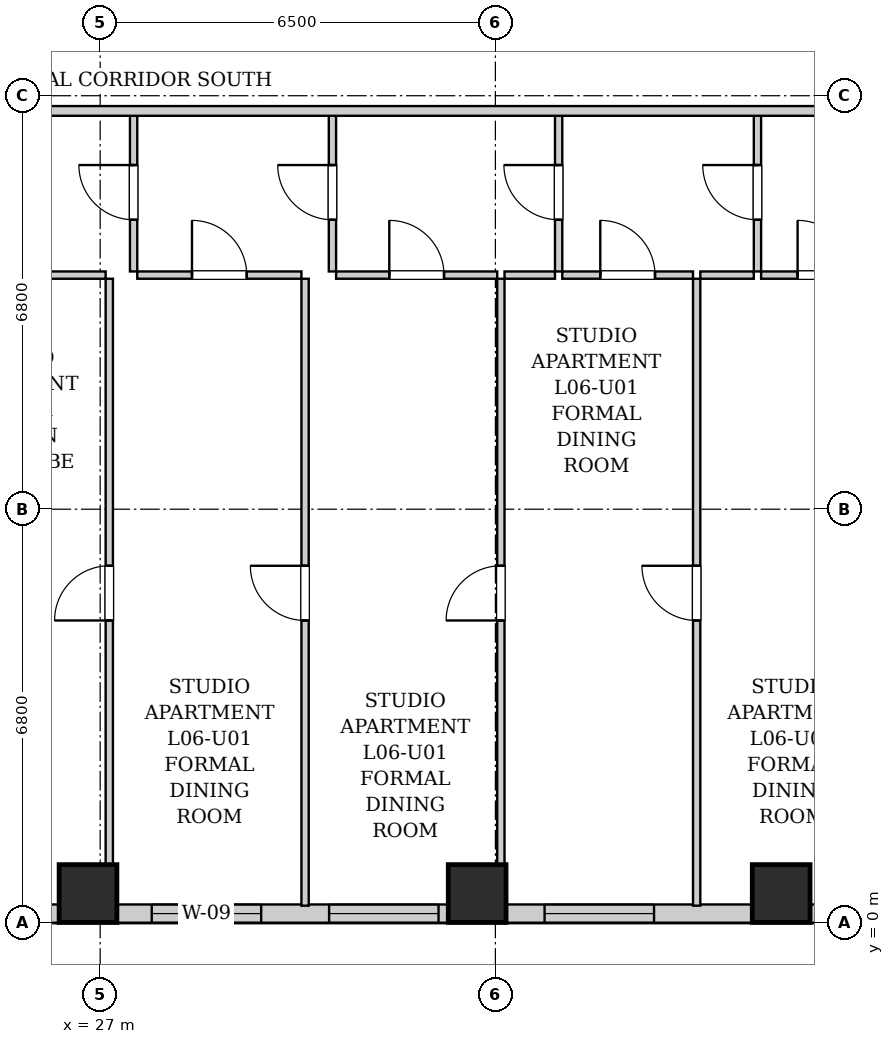
"""IFC4 building model, lengths in metres.
Left out: names, types, materials, properties, quantities, classifications, styles, units other than length and angle.
Written with IfcOpenShell. Run it as: python <this file> out.ifc"""

import sys

from ifc_helpers import new_model, si_unit, direction, frame, frame_2d, origin, origin_2d, place, context, subcontext, project, spatial, rectangle, extrude, element, fill, save


model = new_model("IFC4")
c1 = context("Model", 3, precision=1e-05, world=origin(), true_north=direction((0.0, 1.0)))
c2 = subcontext(c1, "Body", "Model", "MODEL_VIEW")
j1 = project(units=[si_unit("LENGTHUNIT", "METRE"), si_unit("PLANEANGLEUNIT", "RADIAN")], contexts=[c1])
p1 = place(None, origin())
s1 = spatial("IfcSite", under=j1, at=p1, CompositionType="ELEMENT")
p2 = place(p1, origin())
s2 = spatial("IfcBuilding", under=s1, at=p2, CompositionType="ELEMENT")
p3 = place(p2, frame((0.0, 0.0, 29.0)))
s3 = spatial("IfcBuildingStorey", under=s2, at=p3, CompositionType="ELEMENT", Elevation=29.0)
for number, where, z_axis, x_axis in (
    (1, (26.8, 0.48, 0.0), (0.0, 0.0, 1.0), (1.0, 0.0, 0.0)),
    (2, (33.2, 0.48, 0.0), (0.0, 0.0, 1.0), (1.0, 0.0, 0.0)),
    (3, (38.2, 0.48, 0.0), (0.0, 0.0, 1.0), (1.0, 0.0, 0.0)),
):
    element("IfcColumn", number, at=place(p3, frame(where, z_axis=z_axis, x_axis=x_axis)), inside=s3, PredefinedType="COLUMN", context=c2, shape_type="SweptSolid", body=[
        extrude(rectangle(XDim=0.95, YDim=0.95, at=origin_2d()), origin(), (0.0, 0.0, 1.0), 3.2),
    ])
p4 = place(p3, frame((44.0, 0.15, 0.0), z_axis=(0.0, 0.0, 1.0), x_axis=(-1.0, 0.0, 0.0)))
e4 = element("IfcWall", 4, at=p4, inside=s3, PredefinedType="SOLIDWALL", context=c2, shape_type="SweptSolid", body=[
    extrude(rectangle(XDim=28.1, YDim=0.3, at=frame_2d((14.05, 0.0))), origin(), (0.0, 0.0, 1.0), 1.975),
])
p5 = place(p4, frame((26.835, 0.0, 0.55)))
e5 = element("IfcOpeningElement", 5, at=p5, cuts=e4, PredefinedType="OPENING", context=c2, shape_type="SweptSolid", body=[
    extrude(rectangle(XDim=0.85, YDim=1.2, at=frame_2d((0.425, 0.6))), frame((0.0, 0.16, 0.0), z_axis=(0.0, -1.0, 0.0), x_axis=(1.0, 0.0, 0.0)), (0.0, 0.0, 1.0), 0.32),
])
p6 = place(p4, frame((23.765, 0.0, 0.55)))
e6 = element("IfcOpeningElement", 6, at=p6, cuts=e4, PredefinedType="OPENING", context=c2, shape_type="SweptSolid", body=[
    extrude(rectangle(XDim=1.8, YDim=1.2, at=frame_2d((0.9, 0.6))), frame((0.0, 0.16, 0.0), z_axis=(0.0, -1.0, 0.0), x_axis=(1.0, 0.0, 0.0)), (0.0, 0.0, 1.0), 0.32),
])
p7 = place(p4, frame((21.5, 0.0, 0.55)))
e7 = element("IfcOpeningElement", 7, at=p7, cuts=e4, PredefinedType="OPENING", context=c2, shape_type="SweptSolid", body=[
    extrude(rectangle(XDim=1.35, YDim=1.2, at=frame_2d((0.675, 0.6))), frame((0.0, 0.16, 0.0), z_axis=(0.0, -1.0, 0.0), x_axis=(1.0, 0.0, 0.0)), (0.0, 0.0, 1.0), 0.32),
])
p8 = place(p4, frame((14.352, 0.0, 0.55)))
e8 = element("IfcOpeningElement", 8, at=p8, cuts=e4, PredefinedType="OPENING", context=c2, shape_type="SweptSolid", body=[
    extrude(rectangle(XDim=1.8, YDim=1.2, at=frame_2d((0.9, 0.6))), frame((0.0, 0.16, 0.0), z_axis=(0.0, -1.0, 0.0), x_axis=(1.0, 0.0, 0.0)), (0.0, 0.0, 1.0), 0.32),
])
p9 = place(p4, frame((11.435, 0.0, 0.55)))
e9 = element("IfcOpeningElement", 9, at=p9, cuts=e4, PredefinedType="OPENING", context=c2, shape_type="SweptSolid", body=[
    extrude(rectangle(XDim=1.8, YDim=1.2, at=frame_2d((0.9, 0.6))), frame((0.0, 0.16, 0.0), z_axis=(0.0, -1.0, 0.0), x_axis=(1.0, 0.0, 0.0)), (0.0, 0.0, 1.0), 0.32),
])
p10 = place(p4, frame((7.891, 0.0, 0.55)))
e10 = element("IfcOpeningElement", 10, at=p10, cuts=e4, PredefinedType="OPENING", context=c2, shape_type="SweptSolid", body=[
    extrude(rectangle(XDim=1.8, YDim=1.2, at=frame_2d((0.9, 0.6))), frame((0.0, 0.16, 0.0), z_axis=(0.0, -1.0, 0.0), x_axis=(1.0, 0.0, 0.0)), (0.0, 0.0, 1.0), 0.32),
])
p11 = place(p4, frame((4.315, 0.0, 0.55)))
e11 = element("IfcOpeningElement", 11, at=p11, cuts=e4, PredefinedType="OPENING", context=c2, shape_type="SweptSolid", body=[
    extrude(rectangle(XDim=0.85, YDim=1.2, at=frame_2d((0.425, 0.6))), frame((0.0, 0.16, 0.0), z_axis=(0.0, -1.0, 0.0), x_axis=(1.0, 0.0, 0.0)), (0.0, 0.0, 1.0), 0.32),
])
p12 = place(p3, frame((27.55, 10.71, 0.0), z_axis=(0.0, 0.0, 1.0), x_axis=(0.0, 1.0, 0.0)))
e12 = element("IfcWall", 12, at=p12, inside=s3, PredefinedType="PARTITIONING", context=c2, shape_type="SweptSolid", body=[
    extrude(rectangle(XDim=2.6, YDim=0.12, at=frame_2d((1.3, 0.0))), origin(), (0.0, 0.0, 1.0), 2.94),
])
p13 = place(p12, frame((0.85, 0.0, 0.0)))
e13 = element("IfcOpeningElement", 13, at=p13, cuts=e12, PredefinedType="OPENING", context=c2, shape_type="SweptSolid", body=[
    extrude(rectangle(XDim=0.9, YDim=2.05, at=frame_2d((0.45, 1.025))), frame((0.0, 0.07, 0.0), z_axis=(0.0, -1.0, 0.0), x_axis=(1.0, 0.0, 0.0)), (0.0, 0.0, 1.0), 0.14),
])
p14 = place(p3, frame((23.99, 10.65, 0.0), z_axis=(0.0, 0.0, 1.0), x_axis=(1.0, 0.0, 0.0)))
e14 = element("IfcWall", 14, at=p14, inside=s3, PredefinedType="PARTITIONING", context=c2, shape_type="SweptSolid", body=[
    extrude(rectangle(XDim=3.1, YDim=0.12, at=frame_2d((1.55, 0.0))), origin(), (0.0, 0.0, 1.0), 2.94),
])
p15 = place(p14, frame((1.1, 0.0, 0.0)))
e15 = element("IfcOpeningElement", 15, at=p15, cuts=e14, PredefinedType="OPENING", context=c2, shape_type="SweptSolid", body=[
    extrude(rectangle(XDim=0.9, YDim=2.05, at=frame_2d((0.45, 1.025))), frame((0.0, 0.07, 0.0), z_axis=(0.0, -1.0, 0.0), x_axis=(1.0, 0.0, 0.0)), (0.0, 0.0, 1.0), 0.14),
])
p16 = place(p3, frame((30.82, 10.71, 0.0), z_axis=(0.0, 0.0, 1.0), x_axis=(0.0, 1.0, 0.0)))
e16 = element("IfcWall", 16, at=p16, inside=s3, PredefinedType="PARTITIONING", context=c2, shape_type="SweptSolid", body=[
    extrude(rectangle(XDim=2.6, YDim=0.12, at=frame_2d((1.3, 0.0))), origin(), (0.0, 0.0, 1.0), 2.94),
])
p17 = place(p16, frame((0.85, 0.0, 0.0)))
e17 = element("IfcOpeningElement", 17, at=p17, cuts=e16, PredefinedType="OPENING", context=c2, shape_type="SweptSolid", body=[
    extrude(rectangle(XDim=0.9, YDim=2.05, at=frame_2d((0.45, 1.025))), frame((0.0, 0.07, 0.0), z_axis=(0.0, -1.0, 0.0), x_axis=(1.0, 0.0, 0.0)), (0.0, 0.0, 1.0), 0.14),
])
p18 = place(p3, frame((27.61, 10.65, 0.0), z_axis=(0.0, 0.0, 1.0), x_axis=(1.0, 0.0, 0.0)))
e18 = element("IfcWall", 18, at=p18, inside=s3, PredefinedType="PARTITIONING", context=c2, shape_type="SweptSolid", body=[
    extrude(rectangle(XDim=2.7, YDim=0.12, at=frame_2d((1.35, 0.0))), origin(), (0.0, 0.0, 1.0), 2.94),
])
p19 = place(p18, frame((0.9, 0.0, 0.0)))
e19 = element("IfcOpeningElement", 19, at=p19, cuts=e18, PredefinedType="OPENING", context=c2, shape_type="SweptSolid", body=[
    extrude(rectangle(XDim=0.9, YDim=2.05, at=frame_2d((0.45, 1.025))), frame((0.0, 0.07, 0.0), z_axis=(0.0, -1.0, 0.0), x_axis=(1.0, 0.0, 0.0)), (0.0, 0.0, 1.0), 0.14),
])
p20 = place(p3, frame((34.54, 10.71, 0.0), z_axis=(0.0, 0.0, 1.0), x_axis=(0.0, 1.0, 0.0)))
e20 = element("IfcWall", 20, at=p20, inside=s3, PredefinedType="PARTITIONING", context=c2, shape_type="SweptSolid", body=[
    extrude(rectangle(XDim=2.6, YDim=0.12, at=frame_2d((1.3, 0.0))), origin(), (0.0, 0.0, 1.0), 2.94),
])
p21 = place(p20, frame((0.85, 0.0, 0.0)))
e21 = element("IfcOpeningElement", 21, at=p21, cuts=e20, PredefinedType="OPENING", context=c2, shape_type="SweptSolid", body=[
    extrude(rectangle(XDim=0.9, YDim=2.05, at=frame_2d((0.45, 1.025))), frame((0.0, 0.07, 0.0), z_axis=(0.0, -1.0, 0.0), x_axis=(1.0, 0.0, 0.0)), (0.0, 0.0, 1.0), 0.14),
])
p22 = place(p3, frame((30.88, 10.65, 0.0), z_axis=(0.0, 0.0, 1.0), x_axis=(1.0, 0.0, 0.0)))
e22 = element("IfcWall", 22, at=p22, inside=s3, PredefinedType="PARTITIONING", context=c2, shape_type="SweptSolid", body=[
    extrude(rectangle(XDim=2.65, YDim=0.12, at=frame_2d((1.325, 0.0))), origin(), (0.0, 0.0, 1.0), 2.94),
])
p23 = place(p22, frame((0.875, 0.0, 0.0)))
e23 = element("IfcOpeningElement", 23, at=p23, cuts=e22, PredefinedType="OPENING", context=c2, shape_type="SweptSolid", body=[
    extrude(rectangle(XDim=0.9, YDim=2.05, at=frame_2d((0.45, 1.025))), frame((0.0, 0.07, 0.0), z_axis=(0.0, -1.0, 0.0), x_axis=(1.0, 0.0, 0.0)), (0.0, 0.0, 1.0), 0.14),
])
p24 = place(p3, frame((33.65, 10.65, 0.0), z_axis=(0.0, 0.0, 1.0), x_axis=(1.0, 0.0, 0.0)))
e24 = element("IfcWall", 24, at=p24, inside=s3, PredefinedType="PARTITIONING", context=c2, shape_type="SweptSolid", body=[
    extrude(rectangle(XDim=0.83, YDim=0.12, at=frame_2d((0.415, 0.0))), origin(), (0.0, 0.0, 1.0), 2.94),
])
p25 = place(p3, frame((37.81, 10.71, 0.0), z_axis=(0.0, 0.0, 1.0), x_axis=(0.0, 1.0, 0.0)))
e25 = element("IfcWall", 25, at=p25, inside=s3, PredefinedType="PARTITIONING", context=c2, shape_type="SweptSolid", body=[
    extrude(rectangle(XDim=2.6, YDim=0.12, at=frame_2d((1.3, 0.0))), origin(), (0.0, 0.0, 1.0), 2.94),
])
p26 = place(p25, frame((0.85, 0.0, 0.0)))
e26 = element("IfcOpeningElement", 26, at=p26, cuts=e25, PredefinedType="OPENING", context=c2, shape_type="SweptSolid", body=[
    extrude(rectangle(XDim=0.9, YDim=2.05, at=frame_2d((0.45, 1.025))), frame((0.0, 0.07, 0.0), z_axis=(0.0, -1.0, 0.0), x_axis=(1.0, 0.0, 0.0)), (0.0, 0.0, 1.0), 0.14),
])
p27 = place(p3, frame((34.6, 10.65, 0.0), z_axis=(0.0, 0.0, 1.0), x_axis=(1.0, 0.0, 0.0)))
e27 = element("IfcWall", 27, at=p27, inside=s3, PredefinedType="PARTITIONING", context=c2, shape_type="SweptSolid", body=[
    extrude(rectangle(XDim=2.15, YDim=0.12, at=frame_2d((1.075, 0.0))), origin(), (0.0, 0.0, 1.0), 2.94),
])
p28 = place(p27, frame((0.625, 0.0, 0.0)))
e28 = element("IfcOpeningElement", 28, at=p28, cuts=e27, PredefinedType="OPENING", context=c2, shape_type="SweptSolid", body=[
    extrude(rectangle(XDim=0.9, YDim=2.05, at=frame_2d((0.45, 1.025))), frame((0.0, 0.07, 0.0), z_axis=(0.0, -1.0, 0.0), x_axis=(1.0, 0.0, 0.0)), (0.0, 0.0, 1.0), 0.14),
])
p29 = place(p3, frame((36.87, 10.65, 0.0), z_axis=(0.0, 0.0, 1.0), x_axis=(1.0, 0.0, 0.0)))
e29 = element("IfcWall", 29, at=p29, inside=s3, PredefinedType="PARTITIONING", context=c2, shape_type="SweptSolid", body=[
    extrude(rectangle(XDim=0.88, YDim=0.12, at=frame_2d((0.44, 0.0))), origin(), (0.0, 0.0, 1.0), 2.94),
])
p30 = place(p3, frame((37.87, 10.65, 0.0), z_axis=(0.0, 0.0, 1.0), x_axis=(1.0, 0.0, 0.0)))
e30 = element("IfcWall", 30, at=p30, inside=s3, PredefinedType="PARTITIONING", context=c2, shape_type="SweptSolid", body=[
    extrude(rectangle(XDim=2.1, YDim=0.12, at=frame_2d((1.05, 0.0))), origin(), (0.0, 0.0, 1.0), 2.94),
])
p31 = place(p30, frame((0.6, 0.0, 0.0)))
e31 = element("IfcOpeningElement", 31, at=p31, cuts=e30, PredefinedType="OPENING", context=c2, shape_type="SweptSolid", body=[
    extrude(rectangle(XDim=0.9, YDim=2.05, at=frame_2d((0.45, 1.025))), frame((0.0, 0.07, 0.0), z_axis=(0.0, -1.0, 0.0), x_axis=(1.0, 0.0, 0.0)), (0.0, 0.0, 1.0), 0.14),
])
p32 = place(p3, frame((27.15, 0.28, 0.0), z_axis=(0.0, 0.0, 1.0), x_axis=(0.0, 1.0, 0.0)))
e32 = element("IfcWall", 32, at=p32, inside=s3, PredefinedType="PARTITIONING", context=c2, shape_type="SweptSolid", body=[
    extrude(rectangle(XDim=10.31, YDim=0.12, at=frame_2d((5.155, 0.0))), origin(), (0.0, 0.0, 1.0), 2.94),
])
p33 = place(p32, frame((4.69, 0.0, 0.0)))
e33 = element("IfcOpeningElement", 33, at=p33, cuts=e32, PredefinedType="OPENING", context=c2, shape_type="SweptSolid", body=[
    extrude(rectangle(XDim=0.9, YDim=2.05, at=frame_2d((0.45, 1.025))), frame((0.0, 0.07, 0.0), z_axis=(0.0, -1.0, 0.0), x_axis=(1.0, 0.0, 0.0)), (0.0, 0.0, 1.0), 0.14),
])
p34 = place(p3, frame((30.37, 0.28, 0.0), z_axis=(0.0, 0.0, 1.0), x_axis=(0.0, 1.0, 0.0)))
e34 = element("IfcWall", 34, at=p34, inside=s3, PredefinedType="PARTITIONING", context=c2, shape_type="SweptSolid", body=[
    extrude(rectangle(XDim=10.31, YDim=0.12, at=frame_2d((5.155, 0.0))), origin(), (0.0, 0.0, 1.0), 2.94),
])
p35 = place(p34, frame((4.69, 0.0, 0.0)))
e35 = element("IfcOpeningElement", 35, at=p35, cuts=e34, PredefinedType="OPENING", context=c2, shape_type="SweptSolid", body=[
    extrude(rectangle(XDim=0.9, YDim=2.05, at=frame_2d((0.45, 1.025))), frame((0.0, 0.07, 0.0), z_axis=(0.0, -1.0, 0.0), x_axis=(1.0, 0.0, 0.0)), (0.0, 0.0, 1.0), 0.14),
])
p36 = place(p3, frame((33.59, 0.28, 0.0), z_axis=(0.0, 0.0, 1.0), x_axis=(0.0, 1.0, 0.0)))
e36 = element("IfcWall", 36, at=p36, inside=s3, PredefinedType="PARTITIONING", context=c2, shape_type="SweptSolid", body=[
    extrude(rectangle(XDim=10.31, YDim=0.12, at=frame_2d((5.155, 0.0))), origin(), (0.0, 0.0, 1.0), 2.94),
])
p37 = place(p36, frame((4.69, 0.0, 0.0)))
e37 = element("IfcOpeningElement", 37, at=p37, cuts=e36, PredefinedType="OPENING", context=c2, shape_type="SweptSolid", body=[
    extrude(rectangle(XDim=0.9, YDim=2.05, at=frame_2d((0.45, 1.025))), frame((0.0, 0.07, 0.0), z_axis=(0.0, -1.0, 0.0), x_axis=(1.0, 0.0, 0.0)), (0.0, 0.0, 1.0), 0.14),
])
p38 = place(p3, frame((36.81, 0.28, 0.0), z_axis=(0.0, 0.0, 1.0), x_axis=(0.0, 1.0, 0.0)))
e38 = element("IfcWall", 38, at=p38, inside=s3, PredefinedType="PARTITIONING", context=c2, shape_type="SweptSolid", body=[
    extrude(rectangle(XDim=10.31, YDim=0.12, at=frame_2d((5.155, 0.0))), origin(), (0.0, 0.0, 1.0), 2.94),
])
p39 = place(p38, frame((4.69, 0.0, 0.0)))
e39 = element("IfcOpeningElement", 39, at=p39, cuts=e38, PredefinedType="OPENING", context=c2, shape_type="SweptSolid", body=[
    extrude(rectangle(XDim=0.9, YDim=2.05, at=frame_2d((0.45, 1.025))), frame((0.0, 0.07, 0.0), z_axis=(0.0, -1.0, 0.0), x_axis=(1.0, 0.0, 0.0)), (0.0, 0.0, 1.0), 0.14),
])
p40 = place(p3, frame((10.05, 13.35, 0.0), z_axis=(0.0, 0.0, 1.0), x_axis=(1.0, 0.0, 0.0)))
e40 = element("IfcWall", 40, at=p40, inside=s3, PredefinedType="PARTITIONING", context=c2, shape_type="SweptSolid", body=[
    extrude(rectangle(XDim=33.9, YDim=0.16, at=frame_2d((16.95, 0.0))), origin(), (0.0, 0.0, 1.0), 2.94),
])
p41 = place(p40, frame((4.165, 0.0, 0.0)))
e41 = element("IfcOpeningElement", 41, at=p41, cuts=e40, PredefinedType="OPENING", context=c2, shape_type="SweptSolid", body=[
    extrude(rectangle(XDim=0.95, YDim=2.1, at=frame_2d((0.475, 1.05))), frame((0.0, 0.09, 0.0), z_axis=(0.0, -1.0, 0.0), x_axis=(1.0, 0.0, 0.0)), (0.0, 0.0, 1.0), 0.18),
])
p42 = place(p13, origin())
e42 = element("IfcDoor", 42, at=p42, inside=s3, OperationType="SINGLE_SWING_RIGHT", PredefinedType="DOOR", context=c2, shape_type="SweptSolid", body=[
    extrude(rectangle(XDim=0.9, YDim=2.05, at=frame_2d((0.45, 1.025))), frame((0.0, 0.025, 0.0), z_axis=(0.0, -1.0, 0.0), x_axis=(1.0, 0.0, 0.0)), (0.0, 0.0, 1.0), 0.05),
])
fill(e13, e42)
p43 = place(p17, origin())
e43 = element("IfcDoor", 43, at=p43, inside=s3, OperationType="SINGLE_SWING_RIGHT", PredefinedType="DOOR", context=c2, shape_type="SweptSolid", body=[
    extrude(rectangle(XDim=0.9, YDim=2.05, at=frame_2d((0.45, 1.025))), frame((0.0, 0.025, 0.0), z_axis=(0.0, -1.0, 0.0), x_axis=(1.0, 0.0, 0.0)), (0.0, 0.0, 1.0), 0.05),
])
fill(e17, e43)
p44 = place(p19, origin())
e44 = element("IfcDoor", 44, at=p44, inside=s3, OperationType="SINGLE_SWING_LEFT", PredefinedType="DOOR", context=c2, shape_type="SweptSolid", body=[
    extrude(rectangle(XDim=0.9, YDim=2.05, at=frame_2d((0.45, 1.025))), frame((0.0, 0.025, 0.0), z_axis=(0.0, -1.0, 0.0), x_axis=(1.0, 0.0, 0.0)), (0.0, 0.0, 1.0), 0.05),
])
fill(e19, e44)
p45 = place(p21, origin())
e45 = element("IfcDoor", 45, at=p45, inside=s3, OperationType="SINGLE_SWING_RIGHT", PredefinedType="DOOR", context=c2, shape_type="SweptSolid", body=[
    extrude(rectangle(XDim=0.9, YDim=2.05, at=frame_2d((0.45, 1.025))), frame((0.0, 0.025, 0.0), z_axis=(0.0, -1.0, 0.0), x_axis=(1.0, 0.0, 0.0)), (0.0, 0.0, 1.0), 0.05),
])
fill(e21, e45)
p46 = place(p23, origin())
e46 = element("IfcDoor", 46, at=p46, inside=s3, OperationType="SINGLE_SWING_LEFT", PredefinedType="DOOR", context=c2, shape_type="SweptSolid", body=[
    extrude(rectangle(XDim=0.9, YDim=2.05, at=frame_2d((0.45, 1.025))), frame((0.0, 0.025, 0.0), z_axis=(0.0, -1.0, 0.0), x_axis=(1.0, 0.0, 0.0)), (0.0, 0.0, 1.0), 0.05),
])
fill(e23, e46)
p47 = place(p26, origin())
e47 = element("IfcDoor", 47, at=p47, inside=s3, OperationType="SINGLE_SWING_RIGHT", PredefinedType="DOOR", context=c2, shape_type="SweptSolid", body=[
    extrude(rectangle(XDim=0.9, YDim=2.05, at=frame_2d((0.45, 1.025))), frame((0.0, 0.025, 0.0), z_axis=(0.0, -1.0, 0.0), x_axis=(1.0, 0.0, 0.0)), (0.0, 0.0, 1.0), 0.05),
])
fill(e26, e47)
p48 = place(p28, origin())
e48 = element("IfcDoor", 48, at=p48, inside=s3, OperationType="SINGLE_SWING_LEFT", PredefinedType="DOOR", context=c2, shape_type="SweptSolid", body=[
    extrude(rectangle(XDim=0.9, YDim=2.05, at=frame_2d((0.45, 1.025))), frame((0.0, 0.025, 0.0), z_axis=(0.0, -1.0, 0.0), x_axis=(1.0, 0.0, 0.0)), (0.0, 0.0, 1.0), 0.05),
])
fill(e28, e48)
p49 = place(p31, origin())
e49 = element("IfcDoor", 49, at=p49, inside=s3, OperationType="SINGLE_SWING_LEFT", PredefinedType="DOOR", context=c2, shape_type="SweptSolid", body=[
    extrude(rectangle(XDim=0.9, YDim=2.05, at=frame_2d((0.45, 1.025))), frame((0.0, 0.025, 0.0), z_axis=(0.0, -1.0, 0.0), x_axis=(1.0, 0.0, 0.0)), (0.0, 0.0, 1.0), 0.05),
])
fill(e31, e49)
p50 = place(p33, origin())
e50 = element("IfcDoor", 50, at=p50, inside=s3, OperationType="SINGLE_SWING_LEFT", PredefinedType="DOOR", context=c2, shape_type="SweptSolid", body=[
    extrude(rectangle(XDim=0.9, YDim=2.05, at=frame_2d((0.45, 1.025))), frame((0.0, 0.025, 0.0), z_axis=(0.0, -1.0, 0.0), x_axis=(1.0, 0.0, 0.0)), (0.0, 0.0, 1.0), 0.05),
])
fill(e33, e50)
p51 = place(p35, origin())
e51 = element("IfcDoor", 51, at=p51, inside=s3, OperationType="SINGLE_SWING_RIGHT", PredefinedType="DOOR", context=c2, shape_type="SweptSolid", body=[
    extrude(rectangle(XDim=0.9, YDim=2.05, at=frame_2d((0.45, 1.025))), frame((0.0, 0.025, 0.0), z_axis=(0.0, -1.0, 0.0), x_axis=(1.0, 0.0, 0.0)), (0.0, 0.0, 1.0), 0.05),
])
fill(e35, e51)
p52 = place(p37, origin())
e52 = element("IfcDoor", 52, at=p52, inside=s3, OperationType="SINGLE_SWING_LEFT", PredefinedType="DOOR", context=c2, shape_type="SweptSolid", body=[
    extrude(rectangle(XDim=0.9, YDim=2.05, at=frame_2d((0.45, 1.025))), frame((0.0, 0.025, 0.0), z_axis=(0.0, -1.0, 0.0), x_axis=(1.0, 0.0, 0.0)), (0.0, 0.0, 1.0), 0.05),
])
fill(e37, e52)
p53 = place(p39, origin())
e53 = element("IfcDoor", 53, at=p53, inside=s3, OperationType="SINGLE_SWING_RIGHT", PredefinedType="DOOR", context=c2, shape_type="SweptSolid", body=[
    extrude(rectangle(XDim=0.9, YDim=2.05, at=frame_2d((0.45, 1.025))), frame((0.0, 0.025, 0.0), z_axis=(0.0, -1.0, 0.0), x_axis=(1.0, 0.0, 0.0)), (0.0, 0.0, 1.0), 0.05),
])
fill(e39, e53)
p54 = place(p8, origin())
e54 = element("IfcWindow", 54, at=p54, inside=s3, PartitioningType="DOUBLE_PANEL_VERTICAL", PredefinedType="WINDOW", context=c2, shape_type="SweptSolid", body=[
    extrude(rectangle(XDim=1.8, YDim=1.2, at=frame_2d((0.9, 0.6))), frame((0.0, 0.03, 0.0), z_axis=(0.0, -1.0, 0.0), x_axis=(1.0, 0.0, 0.0)), (0.0, 0.0, 1.0), 0.06),
])
fill(e8, e54)
p55 = place(p9, origin())
e55 = element("IfcWindow", 55, at=p55, inside=s3, PartitioningType="DOUBLE_PANEL_VERTICAL", PredefinedType="WINDOW", context=c2, shape_type="SweptSolid", body=[
    extrude(rectangle(XDim=1.8, YDim=1.2, at=frame_2d((0.9, 0.6))), frame((0.0, 0.03, 0.0), z_axis=(0.0, -1.0, 0.0), x_axis=(1.0, 0.0, 0.0)), (0.0, 0.0, 1.0), 0.06),
])
fill(e9, e55)
p56 = place(p10, origin())
e56 = element("IfcWindow", 56, at=p56, inside=s3, PartitioningType="DOUBLE_PANEL_VERTICAL", PredefinedType="WINDOW", context=c2, shape_type="SweptSolid", body=[
    extrude(rectangle(XDim=1.8, YDim=1.2, at=frame_2d((0.9, 0.6))), frame((0.0, 0.03, 0.0), z_axis=(0.0, -1.0, 0.0), x_axis=(1.0, 0.0, 0.0)), (0.0, 0.0, 1.0), 0.06),
])
fill(e10, e56)
save(model, sys.argv[1])
